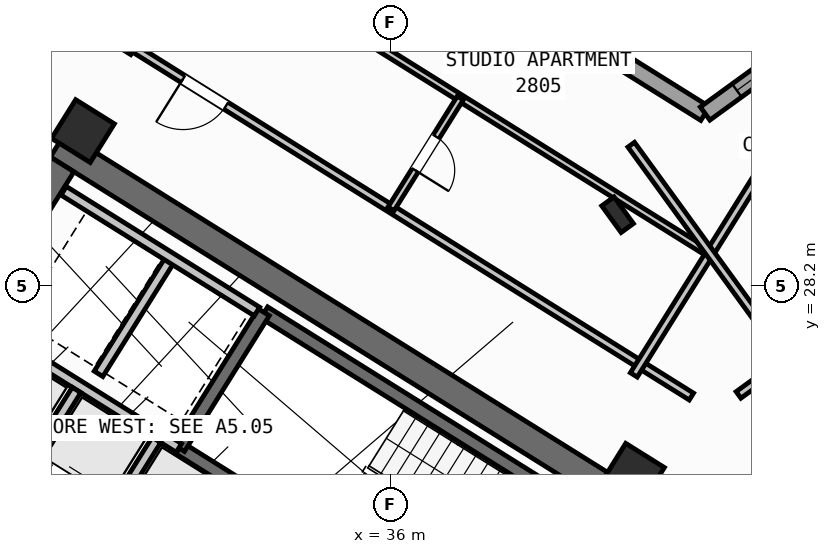
"""IFC4 building model, lengths in metres.
Left out: names, types, materials, properties, quantities, classifications, styles, units other than length and angle.
Written with IfcOpenShell. Run it as: python <this file> out.ifc"""

import sys

from ifc_helpers import new_model, si_unit, direction, frame, frame_2d, origin, origin_2d, place, context, subcontext, project, spatial, rectangle, hollow_rectangle, i_section, extrude, source, transform, mapped, element, fill, save


model = new_model("IFC4")
c1 = context("Model", 3, precision=1e-05, world=origin(), true_north=direction((0.0, 1.0)))
c2 = subcontext(c1, "Body", "Model", "MODEL_VIEW")
j1 = project(units=[si_unit("LENGTHUNIT", "METRE"), si_unit("PLANEANGLEUNIT", "RADIAN")], contexts=[c1])
p1 = place(None, origin())
s1 = spatial("IfcSite", under=j1, at=p1, CompositionType="ELEMENT")
p2 = place(p1, origin())
s2 = spatial("IfcBuilding", under=s1, at=p2, CompositionType="ELEMENT")
p3 = place(p2, frame((0.0, 0.0, 112.5)))
s3 = spatial("IfcBuildingStorey", under=s2, at=p3, CompositionType="ELEMENT", Elevation=112.5)
p4 = place(p3, frame((40.573, 24.01, 0.0), z_axis=(0.0, 0.0, 1.0), x_axis=(-0.848047359947, 0.529920442413, 0.0)))
e1 = element("IfcWall", 1, at=p4, inside=s3, PredefinedType="SHEAR", context=c2, shape_type="SweptSolid", body=[
    extrude(rectangle(XDim=13.14, YDim=0.55, at=frame_2d((6.57, 0.0))), origin(), (0.0, 0.0, 1.0), 3.35),
])
p5 = place(p3, frame((29.517, 30.594, 0.0), z_axis=(0.0, 0.0, 1.0), x_axis=(-0.529906864564, -0.848055844204, 0.0)))
e2 = element("IfcWall", 2, at=p5, inside=s3, PredefinedType="SHEAR", context=c2, shape_type="SweptSolid", body=[
    extrude(rectangle(XDim=3.575, YDim=0.55, at=frame_2d((1.788, 0.0))), origin(), (0.0, 0.0, 1.0), 3.35),
])
m1 = source(origin(), c2, "Body", "SweptSolid", [
    extrude(hollow_rectangle(XDim=0.9, YDim=0.9, WallThickness=0.036, at=origin_2d()), origin(), (0.0, 0.0, 1.0), 3.6),
])
for number, where, z_axis, x_axis in (
    (3, (40.783, 24.469, 0.0), (0.0, 0.0, 1.0), (-0.848, 0.53, 0.0)),
    (4, (29.928, 31.251, 0.0), (0.0, 0.0, 1.0), (-0.848, 0.53, 0.0)),
):
    element("IfcColumn", number, at=place(p3, frame(where, z_axis=z_axis, x_axis=x_axis)), inside=s3, PredefinedType="COLUMN", context=c2, shape_type="MappedRepresentation", body=[
        mapped(m1, transform((0.0, 0.0, 0.0), scale=1.0)),
    ])
m2 = source(origin(), c2, "Body", "SweptSolid", [
    extrude(i_section(OverallWidth=0.3, OverallDepth=0.65, WebThickness=0.016, FlangeThickness=0.031, at=origin_2d()), origin(), (0.0, 0.0, 1.0), 3.6),
])
p6 = place(p3, frame((40.479, 29.601, 0.0), z_axis=(0.0, 0.0, 1.0), x_axis=(0.809016994375, 0.587785252292, 0.0)))
e5 = element("IfcColumn", 5, at=p6, inside=s3, PredefinedType="COLUMN", context=c2, shape_type="MappedRepresentation", body=[
    mapped(m2, transform((0.0, 0.0, 0.0), scale=1.0)),
])
p7 = place(p3, frame((31.76, 12.183, 0.0), z_axis=(0.0, 0.0, 1.0), x_axis=(-0.848047074256, 0.529920899612, 0.0)))
e6 = element("IfcWall", 6, at=p7, inside=s3, PredefinedType="STANDARD", context=c2, shape_type="SweptSolid", body=[
    extrude(rectangle(XDim=30.652, YDim=0.32, at=frame_2d((15.326, 0.0))), origin(), (0.0, 0.0, 1.0), 3.35),
])
p8 = place(p7, frame((15.153, 0.0, 0.0)))
e7 = element("IfcOpeningElement", 7, at=p8, cuts=e6, PredefinedType="OPENING", context=c2, shape_type="SweptSolid", body=[
    extrude(rectangle(XDim=1.2, YDim=2.15, at=frame_2d((0.6, 1.075))), frame((0.0, 0.17, 0.0), z_axis=(0.0, -1.0, 0.0), x_axis=(1.0, 0.0, 0.0)), (0.0, 0.0, 1.0), 0.34),
])
p9 = place(p7, frame((2.002, 0.0, 0.8)))
e8 = element("IfcOpeningElement", 8, at=p9, cuts=e6, PredefinedType="OPENING", context=c2, shape_type="SweptSolid", body=[
    extrude(rectangle(XDim=2.1, YDim=1.55, at=frame_2d((1.05, 0.775))), frame((0.0, 0.17, 0.0), z_axis=(0.0, -1.0, 0.0), x_axis=(1.0, 0.0, 0.0)), (0.0, 0.0, 1.0), 0.34),
])
p10 = place(p7, frame((7.206, 0.0, 0.8)))
e9 = element("IfcOpeningElement", 9, at=p10, cuts=e6, PredefinedType="OPENING", context=c2, shape_type="SweptSolid", body=[
    extrude(rectangle(XDim=2.1, YDim=1.55, at=frame_2d((1.05, 0.775))), frame((0.0, 0.17, 0.0), z_axis=(0.0, -1.0, 0.0), x_axis=(1.0, 0.0, 0.0)), (0.0, 0.0, 1.0), 0.34),
])
p11 = place(p7, frame((12.648, 0.0, 1.0)))
e10 = element("IfcOpeningElement", 10, at=p11, cuts=e6, PredefinedType="OPENING", context=c2, shape_type="SweptSolid", body=[
    extrude(rectangle(XDim=0.9, YDim=1.25, at=frame_2d((0.45, 0.625))), frame((0.0, 0.17, 0.0), z_axis=(0.0, -1.0, 0.0), x_axis=(1.0, 0.0, 0.0)), (0.0, 0.0, 1.0), 0.34),
])
p12 = place(p7, frame((19.59, 0.0, 0.95)))
e11 = element("IfcOpeningElement", 11, at=p12, cuts=e6, PredefinedType="OPENING", context=c2, shape_type="SweptSolid", body=[
    extrude(rectangle(XDim=1.2, YDim=1.4, at=frame_2d((0.6, 0.7))), frame((0.0, 0.17, 0.0), z_axis=(0.0, -1.0, 0.0), x_axis=(1.0, 0.0, 0.0)), (0.0, 0.0, 1.0), 0.34),
])
p13 = place(p7, frame((25.966, 0.0, 1.0)))
e12 = element("IfcOpeningElement", 12, at=p13, cuts=e6, PredefinedType="OPENING", context=c2, shape_type="SweptSolid", body=[
    extrude(rectangle(XDim=0.9, YDim=1.25, at=frame_2d((0.45, 0.625))), frame((0.0, 0.17, 0.0), z_axis=(0.0, -1.0, 0.0), x_axis=(1.0, 0.0, 0.0)), (0.0, 0.0, 1.0), 0.34),
])
p14 = place(p7, frame((28.871, 0.0, 1.0)))
e13 = element("IfcOpeningElement", 13, at=p14, cuts=e6, PredefinedType="OPENING", context=c2, shape_type="SweptSolid", body=[
    extrude(rectangle(XDim=0.9, YDim=1.25, at=frame_2d((0.45, 0.625))), frame((0.0, 0.17, 0.0), z_axis=(0.0, -1.0, 0.0), x_axis=(1.0, 0.0, 0.0)), (0.0, 0.0, 1.0), 0.34),
])
p15 = place(p3, frame((17.424, 47.083, 0.0), z_axis=(0.0, 0.0, 1.0), x_axis=(0.848049927979, -0.529916332693, 0.0)))
e14 = element("IfcWall", 14, at=p15, inside=s3, PredefinedType="STANDARD", context=c2, shape_type="SweptSolid", body=[
    extrude(rectangle(XDim=29.223, YDim=0.32, at=frame_2d((14.612, 0.0))), origin(), (0.0, 0.0, 1.0), 3.35),
])
p16 = place(p15, frame((3.77, 0.0, 0.0)))
e15 = element("IfcOpeningElement", 15, at=p16, cuts=e14, PredefinedType="OPENING", context=c2, shape_type="SweptSolid", body=[
    extrude(rectangle(XDim=1.05, YDim=2.15, at=frame_2d((0.525, 1.075))), frame((0.0, 0.17, 0.0), z_axis=(0.0, -1.0, 0.0), x_axis=(1.0, 0.0, 0.0)), (0.0, 0.0, 1.0), 0.34),
])
p17 = place(p15, frame((0.9, 0.0, 0.8)))
e16 = element("IfcOpeningElement", 16, at=p17, cuts=e14, PredefinedType="OPENING", context=c2, shape_type="SweptSolid", body=[
    extrude(rectangle(XDim=2.1, YDim=1.55, at=frame_2d((1.05, 0.775))), frame((0.0, 0.17, 0.0), z_axis=(0.0, -1.0, 0.0), x_axis=(1.0, 0.0, 0.0)), (0.0, 0.0, 1.0), 0.34),
])
p18 = place(p15, frame((6.972, 0.0, 1.0)))
e17 = element("IfcOpeningElement", 17, at=p18, cuts=e14, PredefinedType="OPENING", context=c2, shape_type="SweptSolid", body=[
    extrude(rectangle(XDim=0.9, YDim=1.25, at=frame_2d((0.45, 0.625))), frame((0.0, 0.17, 0.0), z_axis=(0.0, -1.0, 0.0), x_axis=(1.0, 0.0, 0.0)), (0.0, 0.0, 1.0), 0.34),
])
p19 = place(p15, frame((9.847, 0.0, 0.85)))
e18 = element("IfcOpeningElement", 18, at=p19, cuts=e14, PredefinedType="OPENING", context=c2, shape_type="SweptSolid", body=[
    extrude(rectangle(XDim=1.5, YDim=1.5, at=frame_2d((0.75, 0.75))), frame((0.0, 0.17, 0.0), z_axis=(0.0, -1.0, 0.0), x_axis=(1.0, 0.0, 0.0)), (0.0, 0.0, 1.0), 0.34),
])
p20 = place(p15, frame((13.889, 0.0, 0.95)))
e19 = element("IfcOpeningElement", 19, at=p20, cuts=e14, PredefinedType="OPENING", context=c2, shape_type="SweptSolid", body=[
    extrude(rectangle(XDim=1.2, YDim=1.4, at=frame_2d((0.6, 0.7))), frame((0.0, 0.17, 0.0), z_axis=(0.0, -1.0, 0.0), x_axis=(1.0, 0.0, 0.0)), (0.0, 0.0, 1.0), 0.34),
])
p21 = place(p15, frame((17.254, 0.0, 1.0)))
e20 = element("IfcOpeningElement", 20, at=p21, cuts=e14, PredefinedType="OPENING", context=c2, shape_type="SweptSolid", body=[
    extrude(rectangle(XDim=0.9, YDim=1.25, at=frame_2d((0.45, 0.625))), frame((0.0, 0.17, 0.0), z_axis=(0.0, -1.0, 0.0), x_axis=(1.0, 0.0, 0.0)), (0.0, 0.0, 1.0), 0.34),
])
p22 = place(p15, frame((20.764, 0.0, 0.8)))
e21 = element("IfcOpeningElement", 21, at=p22, cuts=e14, PredefinedType="OPENING", context=c2, shape_type="SweptSolid", body=[
    extrude(rectangle(XDim=2.1, YDim=1.55, at=frame_2d((1.05, 0.775))), frame((0.0, 0.17, 0.0), z_axis=(0.0, -1.0, 0.0), x_axis=(1.0, 0.0, 0.0)), (0.0, 0.0, 1.0), 0.34),
])
p23 = place(p15, frame((25.403, 0.0, 0.8)))
e22 = element("IfcOpeningElement", 22, at=p23, cuts=e14, PredefinedType="OPENING", context=c2, shape_type="SweptSolid", body=[
    extrude(rectangle(XDim=2.1, YDim=1.55, at=frame_2d((1.05, 0.775))), frame((0.0, 0.17, 0.0), z_axis=(0.0, -1.0, 0.0), x_axis=(1.0, 0.0, 0.0)), (0.0, 0.0, 1.0), 0.34),
])
p24 = place(p3, frame((42.207, 31.597, 0.0), z_axis=(0.0, 0.0, 1.0), x_axis=(0.809020333377, 0.587780656523, 0.0)))
e23 = element("IfcWall", 23, at=p24, inside=s3, PredefinedType="STANDARD", context=c2, shape_type="SweptSolid", body=[
    extrude(rectangle(XDim=15.223, YDim=0.32, at=frame_2d((7.611, 0.0))), origin(), (0.0, 0.0, 1.0), 3.35),
])
p25 = place(p24, frame((12.82, 0.0, 0.0)))
e24 = element("IfcOpeningElement", 24, at=p25, cuts=e23, PredefinedType="OPENING", context=c2, shape_type="SweptSolid", body=[
    extrude(rectangle(XDim=1.05, YDim=2.15, at=frame_2d((0.525, 1.075))), frame((0.0, 0.17, 0.0), z_axis=(0.0, -1.0, 0.0), x_axis=(1.0, 0.0, 0.0)), (0.0, 0.0, 1.0), 0.34),
])
p26 = place(p24, frame((0.775, 0.0, 0.85)))
e25 = element("IfcOpeningElement", 25, at=p26, cuts=e23, PredefinedType="OPENING", context=c2, shape_type="SweptSolid", body=[
    extrude(rectangle(XDim=1.8, YDim=1.5, at=frame_2d((0.9, 0.75))), frame((0.0, 0.17, 0.0), z_axis=(0.0, -1.0, 0.0), x_axis=(1.0, 0.0, 0.0)), (0.0, 0.0, 1.0), 0.34),
])
p27 = place(p24, frame((5.544, 0.0, 0.85)))
e26 = element("IfcOpeningElement", 26, at=p27, cuts=e23, PredefinedType="OPENING", context=c2, shape_type="SweptSolid", body=[
    extrude(rectangle(XDim=1.8, YDim=1.5, at=frame_2d((0.9, 0.75))), frame((0.0, 0.17, 0.0), z_axis=(0.0, -1.0, 0.0), x_axis=(1.0, 0.0, 0.0)), (0.0, 0.0, 1.0), 0.34),
])
p28 = place(p24, frame((10.219, 0.0, 1.0)))
e27 = element("IfcOpeningElement", 27, at=p28, cuts=e23, PredefinedType="OPENING", context=c2, shape_type="SweptSolid", body=[
    extrude(rectangle(XDim=0.9, YDim=1.25, at=frame_2d((0.45, 0.625))), frame((0.0, 0.17, 0.0), z_axis=(0.0, -1.0, 0.0), x_axis=(1.0, 0.0, 0.0)), (0.0, 0.0, 1.0), 0.34),
])
p29 = place(p3, frame((39.721, 23.788, 0.0), z_axis=(0.0, 0.0, 1.0), x_axis=(-0.848054434086, 0.529909121291, 0.0)))
e28 = element("IfcWall", 28, at=p29, inside=s3, PredefinedType="SHEAR", context=c2, shape_type="SweptSolid", body=[
    extrude(rectangle(XDim=7.33, YDim=0.26, at=frame_2d((3.665, 0.0))), origin(), (0.0, 0.0, 1.0), 3.35),
])
p30 = place(p3, frame((38.046, 21.108, 0.0), z_axis=(0.0, 0.0, 1.0), x_axis=(-0.848054434086, 0.529909121291, 0.0)))
e29 = element("IfcWall", 29, at=p30, inside=s3, PredefinedType="SHEAR", context=c2, shape_type="SweptSolid", body=[
    extrude(rectangle(XDim=7.33, YDim=0.26, at=frame_2d((3.665, 0.0))), origin(), (0.0, 0.0, 1.0), 3.35),
])
p31 = place(p30, frame((0.22, 0.0, 0.0)))
e30 = element("IfcOpeningElement", 30, at=p31, cuts=e29, PredefinedType="OPENING", context=c2, shape_type="SweptSolid", body=[
    extrude(rectangle(XDim=1.1, YDim=2.1, at=frame_2d((0.55, 1.05))), frame((0.0, 0.14, 0.0), z_axis=(0.0, -1.0, 0.0), x_axis=(1.0, 0.0, 0.0)), (0.0, 0.0, 1.0), 0.28),
])
p32 = place(p3, frame((33.496, 27.677, 0.0), z_axis=(0.0, 0.0, 1.0), x_axis=(-0.529908658664, -0.84805472316, 0.0)))
e31 = element("IfcWall", 31, at=p32, inside=s3, PredefinedType="SHEAR", context=c2, shape_type="SweptSolid", body=[
    extrude(rectangle(XDim=3.16, YDim=0.26, at=frame_2d((1.58, 0.0))), origin(), (0.0, 0.0, 1.0), 3.35),
])
p33 = place(p3, frame((31.822, 24.998, 0.0), z_axis=(0.0, 0.0, 1.0), x_axis=(-0.848036912365, 0.52993716162, 0.0)))
e32 = element("IfcWall", 32, at=p33, inside=s3, PredefinedType="STANDARD", context=c2, shape_type="SweptSolid", body=[
    extrude(rectangle(XDim=4.618, YDim=0.2, at=frame_2d((2.309, 0.0))), origin(), (0.0, 0.0, 1.0), 3.34),
])
p34 = place(p3, frame((32.108, 22.814, 0.0), z_axis=(0.0, 0.0, 1.0), x_axis=(-0.848042229521, 0.529928652696, 0.0)))
e33 = element("IfcWall", 33, at=p34, inside=s3, PredefinedType="STANDARD", context=c2, shape_type="SweptSolid", body=[
    extrude(rectangle(XDim=5.62, YDim=0.2, at=frame_2d((2.81, 0.0))), origin(), (0.0, 0.0, 1.0), 3.34),
])
p35 = place(p34, frame((0.39, 0.0, 0.0)))
e34 = element("IfcOpeningElement", 34, at=p35, cuts=e33, PredefinedType="OPENING", context=c2, shape_type="SweptSolid", body=[
    extrude(rectangle(XDim=1.1, YDim=2.15, at=frame_2d((0.55, 1.075))), frame((0.0, 0.11, 0.0), z_axis=(0.0, -1.0, 0.0), x_axis=(1.0, 0.0, 0.0)), (0.0, 0.0, 1.0), 0.22),
])
p36 = place(p34, frame((2.25, 0.0, 0.0)))
e35 = element("IfcOpeningElement", 35, at=p36, cuts=e33, PredefinedType="OPENING", context=c2, shape_type="SweptSolid", body=[
    extrude(rectangle(XDim=1.1, YDim=2.15, at=frame_2d((0.55, 1.075))), frame((0.0, 0.11, 0.0), z_axis=(0.0, -1.0, 0.0), x_axis=(1.0, 0.0, 0.0)), (0.0, 0.0, 1.0), 0.22),
])
p37 = place(p34, frame((4.11, 0.0, 0.0)))
e36 = element("IfcOpeningElement", 36, at=p37, cuts=e33, PredefinedType="OPENING", context=c2, shape_type="SweptSolid", body=[
    extrude(rectangle(XDim=1.1, YDim=2.15, at=frame_2d((0.55, 1.075))), frame((0.0, 0.11, 0.0), z_axis=(0.0, -1.0, 0.0), x_axis=(1.0, 0.0, 0.0)), (0.0, 0.0, 1.0), 0.22),
])
p38 = place(p3, frame((31.645, 28.716, 0.0), z_axis=(0.0, 0.0, 1.0), x_axis=(-0.52986693015, -0.848080795876, 0.0)))
e37 = element("IfcWall", 37, at=p38, inside=s3, PredefinedType="STANDARD", context=c2, shape_type="SweptSolid", body=[
    extrude(rectangle(XDim=2.66, YDim=0.2, at=frame_2d((1.33, 0.0))), origin(), (0.0, 0.0, 1.0), 3.34),
])
p39 = place(p3, frame((33.363, 27.69, 0.0), z_axis=(0.0, 0.0, 1.0), x_axis=(-0.848047090064, 0.529920874315, 0.0)))
e38 = element("IfcWall", 38, at=p39, inside=s3, PredefinedType="STANDARD", context=c2, shape_type="SweptSolid", body=[
    extrude(rectangle(XDim=4.498, YDim=0.2, at=frame_2d((2.249, 0.0))), origin(), (0.0, 0.0, 1.0), 3.34),
])
for number, where, z_axis, x_axis in (
    (39, (31.379, 25.156, 0.0), (0.0, 0.0, 1.0), (-0.53, -0.848, 0.0)),
    (40, (29.801, 26.142, 0.0), (0.0, 0.0, 1.0), (-0.53, -0.848, 0.0)),
):
    element("IfcWall", number, at=place(p3, frame(where, z_axis=z_axis, x_axis=x_axis)), inside=s3, PredefinedType="STANDARD", context=c2, shape_type="SweptSolid", body=[
        extrude(rectangle(XDim=1.58, YDim=0.2, at=frame_2d((0.79, 0.0))), origin(), (0.0, 0.0, 1.0), 3.34),
    ])
p40 = place(p3, frame((31.525, 21.504, 0.0), z_axis=(0.0, 0.0, 1.0), x_axis=(-0.848040211232, 0.529931882541, 0.0)))
e41 = element("IfcWall", 41, at=p40, inside=s3, PredefinedType="STANDARD", context=c2, shape_type="SweptSolid", body=[
    extrude(rectangle(XDim=6.218, YDim=0.2, at=frame_2d((3.109, 0.0))), origin(), (0.0, 0.0, 1.0), 3.34),
])
p41 = place(p40, frame((4.4, 0.0, 0.0)))
e42 = element("IfcOpeningElement", 42, at=p41, cuts=e41, PredefinedType="OPENING", context=c2, shape_type="SweptSolid", body=[
    extrude(rectangle(XDim=0.86, YDim=2.05, at=frame_2d((0.43, 1.025))), frame((0.0, 0.11, 0.0), z_axis=(0.0, -1.0, 0.0), x_axis=(1.0, 0.0, 0.0)), (0.0, 0.0, 1.0), 0.22),
])
p42 = place(p40, frame((0.35, 0.0, 0.0)))
e43 = element("IfcOpeningElement", 43, at=p42, cuts=e41, PredefinedType="OPENING", context=c2, shape_type="SweptSolid", body=[
    extrude(rectangle(XDim=0.86, YDim=2.05, at=frame_2d((0.43, 1.025))), frame((0.0, 0.11, 0.0), z_axis=(0.0, -1.0, 0.0), x_axis=(1.0, 0.0, 0.0)), (0.0, 0.0, 1.0), 0.22),
])
p43 = place(p3, frame((30.914, 32.829, 0.0), z_axis=(0.0, 0.0, 1.0), x_axis=(-0.848008813643, 0.529982124211, 0.0)))
e44 = element("IfcWall", 44, at=p43, inside=s3, PredefinedType="PARTITIONING", context=c2, shape_type="SweptSolid", body=[
    extrude(rectangle(XDim=2.61, YDim=0.16, at=frame_2d((1.305, 0.0))), origin(), (0.0, 0.0, 1.0), 3.34),
])
p44 = place(p3, frame((31.239, 38.274, 0.0), z_axis=(0.0, 0.0, 1.0), x_axis=(-0.529925472745, -0.848044216616, 0.0)))
e45 = element("IfcWall", 45, at=p44, inside=s3, PredefinedType="PARTITIONING", context=c2, shape_type="SweptSolid", body=[
    extrude(rectangle(XDim=11.65, YDim=0.16, at=frame_2d((5.825, 0.0))), origin(), (0.0, 0.0, 1.0), 3.34),
])
p45 = place(p3, frame((41.936, 26.012, 0.0), z_axis=(0.0, 0.0, 1.0), x_axis=(-0.848051154596, 0.529914369676, 0.0)))
e46 = element("IfcWall", 46, at=p45, inside=s3, PredefinedType="PARTITIONING", context=c2, shape_type="SweptSolid", body=[
    extrude(rectangle(XDim=15.57, YDim=0.16, at=frame_2d((7.785, 0.0))), origin(), (0.0, 0.0, 1.0), 3.34),
])
p46 = place(p45, frame((10.83, 0.0, 0.0)))
e47 = element("IfcOpeningElement", 47, at=p46, cuts=e46, PredefinedType="OPENING", context=c2, shape_type="SweptSolid", body=[
    extrude(rectangle(XDim=1.0, YDim=2.1, at=frame_2d((0.5, 1.05))), frame((0.0, 0.09, 0.0), z_axis=(0.0, -1.0, 0.0), x_axis=(1.0, 0.0, 0.0)), (0.0, 0.0, 1.0), 0.18),
])
p47 = place(p3, frame((43.704, 31.086, 0.0), z_axis=(0.0, 0.0, 1.0), x_axis=(-0.529906828443, -0.848055866774, 0.0)))
e48 = element("IfcWall", 48, at=p47, inside=s3, PredefinedType="PARTITIONING", context=c2, shape_type="SweptSolid", body=[
    extrude(rectangle(XDim=5.48, YDim=0.16, at=frame_2d((2.74, 0.0))), origin(), (0.0, 0.0, 1.0), 3.34),
])
p48 = place(p3, frame((42.226, 28.873, 0.0), z_axis=(0.0, 0.0, 1.0), x_axis=(-0.848049134363, 0.529917602752, 0.0)))
e49 = element("IfcWall", 49, at=p48, inside=s3, PredefinedType="PLUMBINGWALL", context=c2, shape_type="SweptSolid", body=[
    extrude(rectangle(XDim=14.3, YDim=0.14, at=frame_2d((7.15, 0.0))), origin(), (0.0, 0.0, 1.0), 3.34),
])
p49 = place(p48, frame((9.57, 0.0, 0.0)))
e50 = element("IfcOpeningElement", 50, at=p49, cuts=e49, PredefinedType="OPENING", context=c2, shape_type="SweptSolid", body=[
    extrude(rectangle(XDim=0.92, YDim=2.08, at=frame_2d((0.46, 1.04))), frame((0.0, 0.08, 0.0), z_axis=(0.0, -1.0, 0.0), x_axis=(1.0, 0.0, 0.0)), (0.0, 0.0, 1.0), 0.16),
])
p50 = place(p3, frame((37.375, 31.904, 0.0), z_axis=(0.0, 0.0, 1.0), x_axis=(-0.529913878929, -0.848051461244, 0.0)))
e51 = element("IfcWall", 51, at=p50, inside=s3, PredefinedType="PLUMBINGWALL", context=c2, shape_type="SweptSolid", body=[
    extrude(rectangle(XDim=2.58, YDim=0.14, at=frame_2d((1.29, 0.0))), origin(), (0.0, 0.0, 1.0), 3.34),
])
p51 = place(p50, frame((0.9, 0.0, 0.0)))
e52 = element("IfcOpeningElement", 52, at=p51, cuts=e51, PredefinedType="OPENING", context=c2, shape_type="SweptSolid", body=[
    extrude(rectangle(XDim=0.78, YDim=2.05, at=frame_2d((0.39, 1.025))), frame((0.0, 0.08, 0.0), z_axis=(0.0, -1.0, 0.0), x_axis=(1.0, 0.0, 0.0)), (0.0, 0.0, 1.0), 0.16),
])
p52 = place(p3, frame((42.866, 26.044, 0.0), z_axis=(0.0, 0.0, 1.0), x_axis=(0.809020254154, 0.587780765566, 0.0)))
e53 = element("IfcWall", 53, at=p52, inside=s3, PredefinedType="PARTITIONING", context=c2, shape_type="SweptSolid", body=[
    extrude(rectangle(XDim=14.67, YDim=0.16, at=frame_2d((7.335, 0.0))), origin(), (0.0, 0.0, 1.0), 3.34),
])
p53 = place(p52, frame((3.215, 0.0, 0.0)))
e54 = element("IfcOpeningElement", 54, at=p53, cuts=e53, PredefinedType="OPENING", context=c2, shape_type="SweptSolid", body=[
    extrude(rectangle(XDim=1.0, YDim=2.1, at=frame_2d((0.5, 1.05))), frame((0.0, 0.09, 0.0), z_axis=(0.0, -1.0, 0.0), x_axis=(1.0, 0.0, 0.0)), (0.0, 0.0, 1.0), 0.18),
])
p54 = place(p52, frame((9.915, 0.0, 0.0)))
e55 = element("IfcOpeningElement", 55, at=p54, cuts=e53, PredefinedType="OPENING", context=c2, shape_type="SweptSolid", body=[
    extrude(rectangle(XDim=1.0, YDim=2.1, at=frame_2d((0.5, 1.05))), frame((0.0, 0.09, 0.0), z_axis=(0.0, -1.0, 0.0), x_axis=(1.0, 0.0, 0.0)), (0.0, 0.0, 1.0), 0.18),
])
p55 = place(p3, frame((43.969, 26.55, 0.0), z_axis=(0.0, 0.0, 1.0), x_axis=(-0.587776919386, 0.80902304852, 0.0)))
e56 = element("IfcWall", 56, at=p55, inside=s3, PredefinedType="PARTITIONING", context=c2, shape_type="SweptSolid", body=[
    extrude(rectangle(XDim=5.48, YDim=0.16, at=frame_2d((2.74, 0.0))), origin(), (0.0, 0.0, 1.0), 3.34),
])
m3 = source(origin(), c2, "Body", "SweptSolid", [
    extrude(rectangle(XDim=2.1, YDim=1.55, at=frame_2d((1.05, 0.775))), frame((0.0, 0.03, 0.0), z_axis=(0.0, -1.0, 0.0), x_axis=(1.0, 0.0, 0.0)), (0.0, 0.0, 1.0), 0.06),
])
p56 = place(p23, origin())
e57 = element("IfcWindow", 57, at=p56, inside=s3, PartitioningType="SINGLE_PANEL", PredefinedType="WINDOW", context=c2, shape_type="MappedRepresentation", body=[
    mapped(m3, transform((0.0, 0.0, 0.0), scale=1.0)),
])
fill(e22, e57)
m4 = source(origin(), c2, "Body", "SweptSolid", [
    extrude(rectangle(XDim=1.8, YDim=1.5, at=frame_2d((0.9, 0.75))), frame((0.0, 0.03, 0.0), z_axis=(0.0, -1.0, 0.0), x_axis=(1.0, 0.0, 0.0)), (0.0, 0.0, 1.0), 0.06),
])
p57 = place(p26, origin())
e58 = element("IfcWindow", 58, at=p57, inside=s3, PartitioningType="SINGLE_PANEL", PredefinedType="WINDOW", context=c2, shape_type="MappedRepresentation", body=[
    mapped(m4, transform((0.0, 0.0, 0.0), scale=1.0)),
])
fill(e25, e58)
m5 = source(origin(), c2, "Body", "SweptSolid", [
    extrude(rectangle(XDim=1.1, YDim=2.15, at=frame_2d((0.55, 1.075))), frame((0.0, 0.025, 0.0), z_axis=(0.0, -1.0, 0.0), x_axis=(1.0, 0.0, 0.0)), (0.0, 0.0, 1.0), 0.05),
])
p58 = place(p36, origin())
e59 = element("IfcDoor", 59, at=p58, inside=s3, OperationType="DOUBLE_DOOR_SLIDING", PredefinedType="DOOR", context=c2, shape_type="MappedRepresentation", body=[
    mapped(m5, transform((0.0, 0.0, 0.0), scale=1.0)),
])
fill(e35, e59)
m6 = source(origin(), c2, "Body", "SweptSolid", [
    extrude(rectangle(XDim=1.0, YDim=2.1, at=frame_2d((0.5, 1.05))), frame((0.0, 0.025, 0.0), z_axis=(0.0, -1.0, 0.0), x_axis=(1.0, 0.0, 0.0)), (0.0, 0.0, 1.0), 0.05),
])
p59 = place(p46, origin())
e60 = element("IfcDoor", 60, at=p59, inside=s3, OperationType="SINGLE_SWING_RIGHT", PredefinedType="DOOR", context=c2, shape_type="MappedRepresentation", body=[
    mapped(m6, transform((0.0, 0.0, 0.0), scale=1.0)),
])
fill(e47, e60)
m7 = source(origin(), c2, "Body", "SweptSolid", [
    extrude(rectangle(XDim=0.78, YDim=2.05, at=frame_2d((0.39, 1.025))), frame((0.0, 0.025, 0.0), z_axis=(0.0, -1.0, 0.0), x_axis=(1.0, 0.0, 0.0)), (0.0, 0.0, 1.0), 0.05),
])
p60 = place(p51, origin())
e61 = element("IfcDoor", 61, at=p60, inside=s3, OperationType="SINGLE_SWING_RIGHT", PredefinedType="DOOR", context=c2, shape_type="MappedRepresentation", body=[
    mapped(m7, transform((0.0, 0.0, 0.0), scale=1.0)),
])
fill(e52, e61)
save(model, sys.argv[1])
